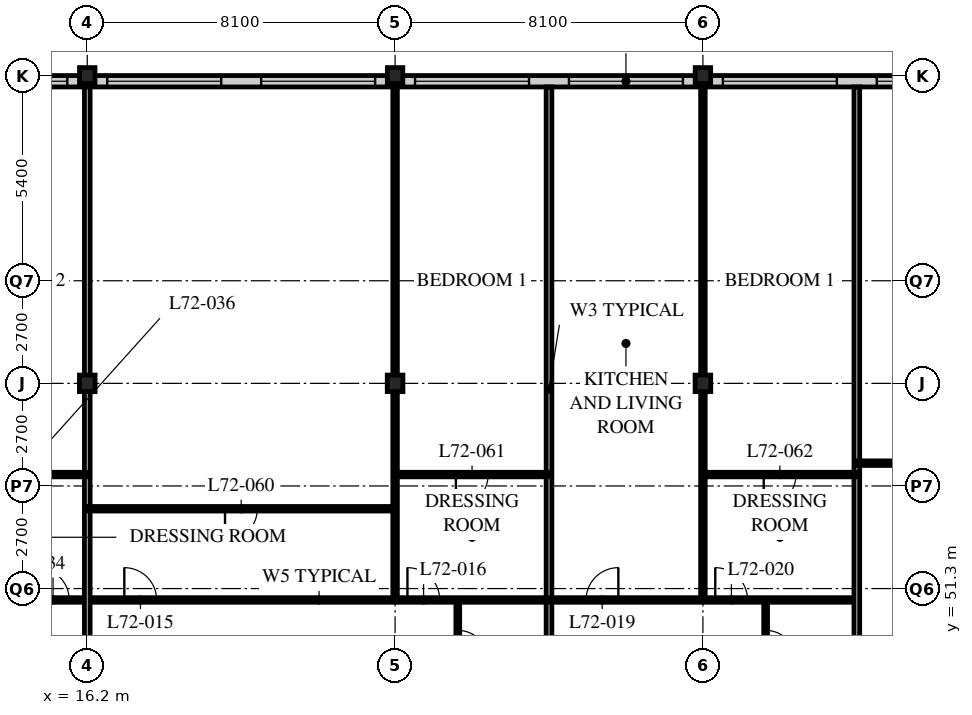
"""IFC4 building model, lengths in metres.
Left out: names, types, materials, properties, quantities, classifications, styles, units other than length and angle.
Written with IfcOpenShell. Run it as: python <this file> out.ifc"""

import sys

from ifc_helpers import new_model, si_unit, direction, frame, frame_2d, origin, origin_2d, place, context, subcontext, project, spatial, rectangle, i_section, extrude, element, fill, save


model = new_model("IFC4")
c1 = context("Model", 3, precision=1e-05, world=origin(), true_north=direction((0.0, 1.0)))
c2 = subcontext(c1, "Body", "Model", "MODEL_VIEW")
j1 = project(units=[si_unit("LENGTHUNIT", "METRE"), si_unit("PLANEANGLEUNIT", "RADIAN")], contexts=[c1])
p1 = place(None, origin())
s1 = spatial("IfcSite", under=j1, at=p1, CompositionType="ELEMENT")
p2 = place(p1, origin())
s2 = spatial("IfcBuilding", under=s1, at=p2, CompositionType="ELEMENT")
p3 = place(p2, frame((0.0, 0.0, 281.4)))
s3 = spatial("IfcBuildingStorey", under=s2, at=p3, CompositionType="ELEMENT", Elevation=281.4)
p4 = place(p3, frame((16.2, 56.7, 0.0), z_axis=(0.0, 0.0, 1.0), x_axis=(1.0, 0.0, 0.0)))
e1 = element("IfcColumn", 1, at=p4, inside=s3, PredefinedType="COLUMN", context=c2, shape_type="SweptSolid", body=[
    extrude(i_section(OverallWidth=0.412, OverallDepth=0.437, WebThickness=0.036, FlangeThickness=0.058, FilletRadius=0.015, at=origin_2d()), origin(), (0.0, 0.0, 1.0), 3.9),
])
p5 = place(p3, frame((16.2, 64.8, 0.0), z_axis=(0.0, 0.0, 1.0), x_axis=(1.0, 0.0, 0.0)))
e2 = element("IfcColumn", 2, at=p5, inside=s3, PredefinedType="COLUMN", context=c2, shape_type="SweptSolid", body=[
    extrude(i_section(OverallWidth=0.407, OverallDepth=0.419, WebThickness=0.031, FlangeThickness=0.049, FilletRadius=0.015, at=origin_2d()), origin(), (0.0, 0.0, 1.0), 3.9),
])
p6 = place(p3, frame((24.3, 56.7, 0.0), z_axis=(0.0, 0.0, 1.0), x_axis=(1.0, 0.0, 0.0)))
e3 = element("IfcColumn", 3, at=p6, inside=s3, PredefinedType="COLUMN", context=c2, shape_type="SweptSolid", body=[
    extrude(i_section(OverallWidth=0.412, OverallDepth=0.437, WebThickness=0.036, FlangeThickness=0.058, FilletRadius=0.015, at=origin_2d()), origin(), (0.0, 0.0, 1.0), 3.9),
])
p7 = place(p3, frame((24.3, 64.8, 0.0), z_axis=(0.0, 0.0, 1.0), x_axis=(1.0, 0.0, 0.0)))
e4 = element("IfcColumn", 4, at=p7, inside=s3, PredefinedType="COLUMN", context=c2, shape_type="SweptSolid", body=[
    extrude(i_section(OverallWidth=0.407, OverallDepth=0.419, WebThickness=0.031, FlangeThickness=0.049, FilletRadius=0.015, at=origin_2d()), origin(), (0.0, 0.0, 1.0), 3.9),
])
p8 = place(p3, frame((32.4, 56.7, 0.0), z_axis=(0.0, 0.0, 1.0), x_axis=(1.0, 0.0, 0.0)))
e5 = element("IfcColumn", 5, at=p8, inside=s3, PredefinedType="COLUMN", context=c2, shape_type="SweptSolid", body=[
    extrude(i_section(OverallWidth=0.412, OverallDepth=0.437, WebThickness=0.036, FlangeThickness=0.058, FilletRadius=0.015, at=origin_2d()), origin(), (0.0, 0.0, 1.0), 3.9),
])
p9 = place(p3, frame((32.4, 64.8, 0.0), z_axis=(0.0, 0.0, 1.0), x_axis=(1.0, 0.0, 0.0)))
e6 = element("IfcColumn", 6, at=p9, inside=s3, PredefinedType="COLUMN", context=c2, shape_type="SweptSolid", body=[
    extrude(i_section(OverallWidth=0.407, OverallDepth=0.419, WebThickness=0.031, FlangeThickness=0.049, FilletRadius=0.015, at=origin_2d()), origin(), (0.0, 0.0, 1.0), 3.9),
])
p10 = place(p3, frame((48.3, 64.65, 0.0), z_axis=(0.0, 0.0, 1.0), x_axis=(-1.0, 0.0, 0.0)))
e7 = element("IfcWall", 7, at=p10, inside=s3, PredefinedType="SOLIDWALL", context=c2, shape_type="SweptSolid", body=[
    extrude(rectangle(XDim=40.2, YDim=0.3, at=frame_2d((20.1, 0.0))), origin(), (0.0, 0.0, 1.0), 3.69),
])
p11 = place(p10, frame((0.225, 0.0, 0.6)))
e8 = element("IfcOpeningElement", 8, at=p11, cuts=e7, PredefinedType="OPENING", context=c2, shape_type="SweptSolid", body=[
    extrude(rectangle(XDim=3.0, YDim=2.4, at=frame_2d((1.5, 1.2))), frame((0.0, 0.16, 0.0), z_axis=(0.0, -1.0, 0.0), x_axis=(1.0, 0.0, 0.0)), (0.0, 0.0, 1.0), 0.32),
])
p12 = place(p10, frame((4.275, 0.0, 0.6)))
e9 = element("IfcOpeningElement", 9, at=p12, cuts=e7, PredefinedType="OPENING", context=c2, shape_type="SweptSolid", body=[
    extrude(rectangle(XDim=3.0, YDim=2.4, at=frame_2d((1.5, 1.2))), frame((0.0, 0.16, 0.0), z_axis=(0.0, -1.0, 0.0), x_axis=(1.0, 0.0, 0.0)), (0.0, 0.0, 1.0), 0.32),
])
p13 = place(p10, frame((8.325, 0.0, 0.6)))
e10 = element("IfcOpeningElement", 10, at=p13, cuts=e7, PredefinedType="OPENING", context=c2, shape_type="SweptSolid", body=[
    extrude(rectangle(XDim=3.0, YDim=2.4, at=frame_2d((1.5, 1.2))), frame((0.0, 0.16, 0.0), z_axis=(0.0, -1.0, 0.0), x_axis=(1.0, 0.0, 0.0)), (0.0, 0.0, 1.0), 0.32),
])
p14 = place(p10, frame((12.375, 0.0, 0.6)))
e11 = element("IfcOpeningElement", 11, at=p14, cuts=e7, PredefinedType="OPENING", context=c2, shape_type="SweptSolid", body=[
    extrude(rectangle(XDim=3.0, YDim=2.4, at=frame_2d((1.5, 1.2))), frame((0.0, 0.16, 0.0), z_axis=(0.0, -1.0, 0.0), x_axis=(1.0, 0.0, 0.0)), (0.0, 0.0, 1.0), 0.32),
])
p15 = place(p10, frame((16.425, 0.0, 0.6)))
e12 = element("IfcOpeningElement", 12, at=p15, cuts=e7, PredefinedType="OPENING", context=c2, shape_type="SweptSolid", body=[
    extrude(rectangle(XDim=3.0, YDim=2.4, at=frame_2d((1.5, 1.2))), frame((0.0, 0.16, 0.0), z_axis=(0.0, -1.0, 0.0), x_axis=(1.0, 0.0, 0.0)), (0.0, 0.0, 1.0), 0.32),
])
p16 = place(p10, frame((20.475, 0.0, 0.6)))
e13 = element("IfcOpeningElement", 13, at=p16, cuts=e7, PredefinedType="OPENING", context=c2, shape_type="SweptSolid", body=[
    extrude(rectangle(XDim=3.0, YDim=2.4, at=frame_2d((1.5, 1.2))), frame((0.0, 0.16, 0.0), z_axis=(0.0, -1.0, 0.0), x_axis=(1.0, 0.0, 0.0)), (0.0, 0.0, 1.0), 0.32),
])
p17 = place(p10, frame((24.525, 0.0, 0.6)))
e14 = element("IfcOpeningElement", 14, at=p17, cuts=e7, PredefinedType="OPENING", context=c2, shape_type="SweptSolid", body=[
    extrude(rectangle(XDim=3.0, YDim=2.4, at=frame_2d((1.5, 1.2))), frame((0.0, 0.16, 0.0), z_axis=(0.0, -1.0, 0.0), x_axis=(1.0, 0.0, 0.0)), (0.0, 0.0, 1.0), 0.32),
])
p18 = place(p10, frame((28.575, 0.0, 0.6)))
e15 = element("IfcOpeningElement", 15, at=p18, cuts=e7, PredefinedType="OPENING", context=c2, shape_type="SweptSolid", body=[
    extrude(rectangle(XDim=3.0, YDim=2.4, at=frame_2d((1.5, 1.2))), frame((0.0, 0.16, 0.0), z_axis=(0.0, -1.0, 0.0), x_axis=(1.0, 0.0, 0.0)), (0.0, 0.0, 1.0), 0.32),
])
p19 = place(p10, frame((32.625, 0.0, 0.6)))
e16 = element("IfcOpeningElement", 16, at=p19, cuts=e7, PredefinedType="OPENING", context=c2, shape_type="SweptSolid", body=[
    extrude(rectangle(XDim=3.0, YDim=2.4, at=frame_2d((1.5, 1.2))), frame((0.0, 0.16, 0.0), z_axis=(0.0, -1.0, 0.0), x_axis=(1.0, 0.0, 0.0)), (0.0, 0.0, 1.0), 0.32),
])
p20 = place(p10, frame((36.675, 0.0, 0.6)))
e17 = element("IfcOpeningElement", 17, at=p20, cuts=e7, PredefinedType="OPENING", context=c2, shape_type="SweptSolid", body=[
    extrude(rectangle(XDim=3.0, YDim=2.4, at=frame_2d((1.5, 1.2))), frame((0.0, 0.16, 0.0), z_axis=(0.0, -1.0, 0.0), x_axis=(1.0, 0.0, 0.0)), (0.0, 0.0, 1.0), 0.32),
])
p21 = place(p3, frame((25.95, 48.6, 0.0), z_axis=(0.0, 0.0, 1.0), x_axis=(0.0, 1.0, 0.0)))
e18 = element("IfcWall", 18, at=p21, inside=s3, PredefinedType="PARTITIONING", context=c2, shape_type="SweptSolid", body=[
    extrude(rectangle(XDim=2.4, YDim=0.1, at=frame_2d((1.2, 0.0))), origin(), (0.0, 0.0, 1.0), 3.69),
])
p22 = place(p21, frame((0.8, 0.0, 0.0)))
e19 = element("IfcOpeningElement", 19, at=p22, cuts=e18, PredefinedType="OPENING", context=c2, shape_type="SweptSolid", body=[
    extrude(rectangle(XDim=0.8, YDim=2.1, at=frame_2d((0.4, 1.05))), frame((0.0, 0.06, 0.0), z_axis=(0.0, -1.0, 0.0), x_axis=(1.0, 0.0, 0.0)), (0.0, 0.0, 1.0), 0.12),
])
p23 = place(p3, frame((24.3, 51.0, 0.0), z_axis=(0.0, 0.0, 1.0), x_axis=(0.0, 1.0, 0.0)))
e20 = element("IfcWall", 20, at=p23, inside=s3, PredefinedType="PARTITIONING", context=c2, shape_type="SweptSolid", body=[
    extrude(rectangle(XDim=13.5, YDim=0.12, at=frame_2d((6.75, 0.0))), origin(), (0.0, 0.0, 1.0), 3.078),
])
p24 = place(p3, frame((28.35, 48.6, 0.0), z_axis=(0.0, 0.0, 1.0), x_axis=(0.0, 1.0, 0.0)))
e21 = element("IfcWall", 21, at=p24, inside=s3, PredefinedType="PARTITIONING", context=c2, shape_type="SweptSolid", body=[
    extrude(rectangle(XDim=15.9, YDim=0.15, at=frame_2d((7.95, 0.0))), origin(), (0.0, 0.0, 1.0), 3.69),
])
p25 = place(p3, frame((34.05, 48.6, 0.0), z_axis=(0.0, 0.0, 1.0), x_axis=(0.0, 1.0, 0.0)))
e22 = element("IfcWall", 22, at=p25, inside=s3, PredefinedType="PARTITIONING", context=c2, shape_type="SweptSolid", body=[
    extrude(rectangle(XDim=2.4, YDim=0.1, at=frame_2d((1.2, 0.0))), origin(), (0.0, 0.0, 1.0), 3.69),
])
p26 = place(p25, frame((0.8, 0.0, 0.0)))
e23 = element("IfcOpeningElement", 23, at=p26, cuts=e22, PredefinedType="OPENING", context=c2, shape_type="SweptSolid", body=[
    extrude(rectangle(XDim=0.8, YDim=2.1, at=frame_2d((0.4, 1.05))), frame((0.0, 0.06, 0.0), z_axis=(0.0, -1.0, 0.0), x_axis=(1.0, 0.0, 0.0)), (0.0, 0.0, 1.0), 0.12),
])
p27 = place(p3, frame((32.4, 51.0, 0.0), z_axis=(0.0, 0.0, 1.0), x_axis=(0.0, 1.0, 0.0)))
e24 = element("IfcWall", 24, at=p27, inside=s3, PredefinedType="PARTITIONING", context=c2, shape_type="SweptSolid", body=[
    extrude(rectangle(XDim=13.5, YDim=0.12, at=frame_2d((6.75, 0.0))), origin(), (0.0, 0.0, 1.0), 3.078),
])
p28 = place(p3, frame((8.15, 51.0, 0.0), z_axis=(0.0, 0.0, 1.0), x_axis=(1.0, 0.0, 0.0)))
e25 = element("IfcWall", 25, at=p28, inside=s3, PredefinedType="PARTITIONING", context=c2, shape_type="SweptSolid", body=[
    extrude(rectangle(XDim=28.3, YDim=0.12, at=frame_2d((14.15, 0.0))), origin(), (0.0, 0.0, 1.0), 3.69),
])
p29 = place(p28, frame((9.025, 0.0, 0.0)))
e26 = element("IfcOpeningElement", 26, at=p29, cuts=e25, PredefinedType="OPENING", context=c2, shape_type="SweptSolid", body=[
    extrude(rectangle(XDim=0.85, YDim=2.1, at=frame_2d((0.425, 1.05))), frame((0.0, 0.07, 0.0), z_axis=(0.0, -1.0, 0.0), x_axis=(1.0, 0.0, 0.0)), (0.0, 0.0, 1.0), 0.14),
])
p30 = place(p28, frame((16.475, 0.0, 0.0)))
e27 = element("IfcOpeningElement", 27, at=p30, cuts=e25, PredefinedType="OPENING", context=c2, shape_type="SweptSolid", body=[
    extrude(rectangle(XDim=0.85, YDim=2.1, at=frame_2d((0.425, 1.05))), frame((0.0, 0.07, 0.0), z_axis=(0.0, -1.0, 0.0), x_axis=(1.0, 0.0, 0.0)), (0.0, 0.0, 1.0), 0.14),
])
p31 = place(p28, frame((21.175, 0.0, 0.0)))
e28 = element("IfcOpeningElement", 28, at=p31, cuts=e25, PredefinedType="OPENING", context=c2, shape_type="SweptSolid", body=[
    extrude(rectangle(XDim=0.85, YDim=2.1, at=frame_2d((0.425, 1.05))), frame((0.0, 0.07, 0.0), z_axis=(0.0, -1.0, 0.0), x_axis=(1.0, 0.0, 0.0)), (0.0, 0.0, 1.0), 0.14),
])
p32 = place(p28, frame((24.575, 0.0, 0.0)))
e29 = element("IfcOpeningElement", 29, at=p32, cuts=e25, PredefinedType="OPENING", context=c2, shape_type="SweptSolid", body=[
    extrude(rectangle(XDim=0.85, YDim=2.1, at=frame_2d((0.425, 1.05))), frame((0.0, 0.07, 0.0), z_axis=(0.0, -1.0, 0.0), x_axis=(1.0, 0.0, 0.0)), (0.0, 0.0, 1.0), 0.14),
])
p33 = place(p28, frame((6.725, 0.0, 0.0)))
e30 = element("IfcOpeningElement", 30, at=p33, cuts=e25, PredefinedType="OPENING", context=c2, shape_type="SweptSolid", body=[
    extrude(rectangle(XDim=0.85, YDim=2.1, at=frame_2d((0.425, 1.05))), frame((0.0, 0.07, 0.0), z_axis=(0.0, -1.0, 0.0), x_axis=(1.0, 0.0, 0.0)), (0.0, 0.0, 1.0), 0.14),
])
p34 = place(p28, frame((2.875, 0.0, 0.0)))
e31 = element("IfcOpeningElement", 31, at=p34, cuts=e25, PredefinedType="OPENING", context=c2, shape_type="SweptSolid", body=[
    extrude(rectangle(XDim=0.85, YDim=2.1, at=frame_2d((0.425, 1.05))), frame((0.0, 0.07, 0.0), z_axis=(0.0, -1.0, 0.0), x_axis=(1.0, 0.0, 0.0)), (0.0, 0.0, 1.0), 0.14),
])
p35 = place(p3, frame((16.2, 48.6, 0.0), z_axis=(0.0, 0.0, 1.0), x_axis=(0.0, 1.0, 0.0)))
e32 = element("IfcWall", 32, at=p35, inside=s3, PredefinedType="PARTITIONING", context=c2, shape_type="SweptSolid", body=[
    extrude(rectangle(XDim=15.9, YDim=0.15, at=frame_2d((7.95, 0.0))), origin(), (0.0, 0.0, 1.0), 3.078),
])
p36 = place(p3, frame((36.45, 64.5, 0.0), z_axis=(0.0, 0.0, 1.0), x_axis=(0.0, -1.0, 0.0)))
e33 = element("IfcWall", 33, at=p36, inside=s3, PredefinedType="PARTITIONING", context=c2, shape_type="SweptSolid", body=[
    extrude(rectangle(XDim=15.9, YDim=0.15, at=frame_2d((7.95, 0.0))), origin(), (0.0, 0.0, 1.0), 3.69),
])
p37 = place(p3, frame((36.45, 54.6, 0.0), z_axis=(0.0, 0.0, 1.0), x_axis=(1.0, 0.0, 0.0)))
e34 = element("IfcWall", 34, at=p37, inside=s3, PredefinedType="PARTITIONING", context=c2, shape_type="SweptSolid", body=[
    extrude(rectangle(XDim=19.95, YDim=0.12, at=frame_2d((9.975, 0.0))), origin(), (0.0, 0.0, 1.0), 3.69),
])
p38 = place(p37, frame((1.675, 0.0, 0.0)))
e35 = element("IfcOpeningElement", 35, at=p38, cuts=e34, PredefinedType="OPENING", context=c2, shape_type="SweptSolid", body=[
    extrude(rectangle(XDim=0.85, YDim=2.1, at=frame_2d((0.425, 1.05))), frame((0.0, 0.07, 0.0), z_axis=(0.0, -1.0, 0.0), x_axis=(1.0, 0.0, 0.0)), (0.0, 0.0, 1.0), 0.14),
])
p39 = place(p3, frame((16.2, 53.4, 0.0), z_axis=(0.0, 0.0, 1.0), x_axis=(1.0, 0.0, 0.0)))
e36 = element("IfcWall", 36, at=p39, inside=s3, PredefinedType="PARTITIONING", context=c2, shape_type="SweptSolid", body=[
    extrude(rectangle(XDim=8.1, YDim=0.12, at=frame_2d((4.05, 0.0))), origin(), (0.0, 0.0, 1.0), 3.69),
])
p40 = place(p39, frame((3.625, 0.0, 0.0)))
e37 = element("IfcOpeningElement", 37, at=p40, cuts=e36, PredefinedType="OPENING", context=c2, shape_type="SweptSolid", body=[
    extrude(rectangle(XDim=0.85, YDim=2.1, at=frame_2d((0.425, 1.05))), frame((0.0, 0.07, 0.0), z_axis=(0.0, -1.0, 0.0), x_axis=(1.0, 0.0, 0.0)), (0.0, 0.0, 1.0), 0.14),
])
p41 = place(p3, frame((24.3, 54.3, 0.0), z_axis=(0.0, 0.0, 1.0), x_axis=(1.0, 0.0, 0.0)))
e38 = element("IfcWall", 38, at=p41, inside=s3, PredefinedType="PARTITIONING", context=c2, shape_type="SweptSolid", body=[
    extrude(rectangle(XDim=4.05, YDim=0.12, at=frame_2d((2.025, 0.0))), origin(), (0.0, 0.0, 1.0), 3.69),
])
p42 = place(p41, frame((1.6, 0.0, 0.0)))
e39 = element("IfcOpeningElement", 39, at=p42, cuts=e38, PredefinedType="OPENING", context=c2, shape_type="SweptSolid", body=[
    extrude(rectangle(XDim=0.85, YDim=2.1, at=frame_2d((0.425, 1.05))), frame((0.0, 0.07, 0.0), z_axis=(0.0, -1.0, 0.0), x_axis=(1.0, 0.0, 0.0)), (0.0, 0.0, 1.0), 0.14),
])
p43 = place(p3, frame((32.4, 54.3, 0.0), z_axis=(0.0, 0.0, 1.0), x_axis=(1.0, 0.0, 0.0)))
e40 = element("IfcWall", 40, at=p43, inside=s3, PredefinedType="PARTITIONING", context=c2, shape_type="SweptSolid", body=[
    extrude(rectangle(XDim=4.05, YDim=0.12, at=frame_2d((2.025, 0.0))), origin(), (0.0, 0.0, 1.0), 3.69),
])
p44 = place(p43, frame((1.6, 0.0, 0.0)))
e41 = element("IfcOpeningElement", 41, at=p44, cuts=e40, PredefinedType="OPENING", context=c2, shape_type="SweptSolid", body=[
    extrude(rectangle(XDim=0.85, YDim=2.1, at=frame_2d((0.425, 1.05))), frame((0.0, 0.07, 0.0), z_axis=(0.0, -1.0, 0.0), x_axis=(1.0, 0.0, 0.0)), (0.0, 0.0, 1.0), 0.14),
])
p45 = place(p3, frame((12.15, 54.3, 0.0), z_axis=(0.0, 0.0, 1.0), x_axis=(1.0, 0.0, 0.0)))
e42 = element("IfcWall", 42, at=p45, inside=s3, PredefinedType="PARTITIONING", context=c2, shape_type="SweptSolid", body=[
    extrude(rectangle(XDim=4.05, YDim=0.12, at=frame_2d((2.025, 0.0))), origin(), (0.0, 0.0, 1.0), 3.69),
])
p46 = place(p45, frame((1.6, 0.0, 0.0)))
e43 = element("IfcOpeningElement", 43, at=p46, cuts=e42, PredefinedType="OPENING", context=c2, shape_type="SweptSolid", body=[
    extrude(rectangle(XDim=0.85, YDim=2.1, at=frame_2d((0.425, 1.05))), frame((0.0, 0.07, 0.0), z_axis=(0.0, -1.0, 0.0), x_axis=(1.0, 0.0, 0.0)), (0.0, 0.0, 1.0), 0.14),
])
p47 = place(p13, origin())
e44 = element("IfcWindow", 44, at=p47, inside=s3, PartitioningType="SINGLE_PANEL", PredefinedType="WINDOW", context=c2, shape_type="SweptSolid", body=[
    extrude(rectangle(XDim=3.0, YDim=2.4, at=frame_2d((1.5, 1.2))), frame((0.0, 0.03, 0.0), z_axis=(0.0, -1.0, 0.0), x_axis=(1.0, 0.0, 0.0)), (0.0, 0.0, 1.0), 0.06),
])
fill(e10, e44)
p48 = place(p14, origin())
e45 = element("IfcWindow", 45, at=p48, inside=s3, PartitioningType="SINGLE_PANEL", PredefinedType="WINDOW", context=c2, shape_type="SweptSolid", body=[
    extrude(rectangle(XDim=3.0, YDim=2.4, at=frame_2d((1.5, 1.2))), frame((0.0, 0.03, 0.0), z_axis=(0.0, -1.0, 0.0), x_axis=(1.0, 0.0, 0.0)), (0.0, 0.0, 1.0), 0.06),
])
fill(e11, e45)
p49 = place(p15, origin())
e46 = element("IfcWindow", 46, at=p49, inside=s3, PartitioningType="SINGLE_PANEL", PredefinedType="WINDOW", context=c2, shape_type="SweptSolid", body=[
    extrude(rectangle(XDim=3.0, YDim=2.4, at=frame_2d((1.5, 1.2))), frame((0.0, 0.03, 0.0), z_axis=(0.0, -1.0, 0.0), x_axis=(1.0, 0.0, 0.0)), (0.0, 0.0, 1.0), 0.06),
])
fill(e12, e46)
p50 = place(p16, origin())
e47 = element("IfcWindow", 47, at=p50, inside=s3, PartitioningType="SINGLE_PANEL", PredefinedType="WINDOW", context=c2, shape_type="SweptSolid", body=[
    extrude(rectangle(XDim=3.0, YDim=2.4, at=frame_2d((1.5, 1.2))), frame((0.0, 0.03, 0.0), z_axis=(0.0, -1.0, 0.0), x_axis=(1.0, 0.0, 0.0)), (0.0, 0.0, 1.0), 0.06),
])
fill(e13, e47)
p51 = place(p17, origin())
e48 = element("IfcWindow", 48, at=p51, inside=s3, PartitioningType="SINGLE_PANEL", PredefinedType="WINDOW", context=c2, shape_type="SweptSolid", body=[
    extrude(rectangle(XDim=3.0, YDim=2.4, at=frame_2d((1.5, 1.2))), frame((0.0, 0.03, 0.0), z_axis=(0.0, -1.0, 0.0), x_axis=(1.0, 0.0, 0.0)), (0.0, 0.0, 1.0), 0.06),
])
fill(e14, e48)
p52 = place(p18, origin())
e49 = element("IfcWindow", 49, at=p52, inside=s3, PartitioningType="SINGLE_PANEL", PredefinedType="WINDOW", context=c2, shape_type="SweptSolid", body=[
    extrude(rectangle(XDim=3.0, YDim=2.4, at=frame_2d((1.5, 1.2))), frame((0.0, 0.03, 0.0), z_axis=(0.0, -1.0, 0.0), x_axis=(1.0, 0.0, 0.0)), (0.0, 0.0, 1.0), 0.06),
])
fill(e15, e49)
p53 = place(p19, origin())
e50 = element("IfcWindow", 50, at=p53, inside=s3, PartitioningType="SINGLE_PANEL", PredefinedType="WINDOW", context=c2, shape_type="SweptSolid", body=[
    extrude(rectangle(XDim=3.0, YDim=2.4, at=frame_2d((1.5, 1.2))), frame((0.0, 0.03, 0.0), z_axis=(0.0, -1.0, 0.0), x_axis=(1.0, 0.0, 0.0)), (0.0, 0.0, 1.0), 0.06),
])
fill(e16, e50)
p54 = place(p22, origin())
e51 = element("IfcDoor", 51, at=p54, inside=s3, OperationType="SINGLE_SWING_RIGHT", PredefinedType="DOOR", context=c2, shape_type="SweptSolid", body=[
    extrude(rectangle(XDim=0.8, YDim=2.1, at=frame_2d((0.4, 1.05))), frame((0.0, 0.025, 0.0), z_axis=(0.0, -1.0, 0.0), x_axis=(1.0, 0.0, 0.0)), (0.0, 0.0, 1.0), 0.05),
])
fill(e19, e51)
p55 = place(p29, origin())
e52 = element("IfcDoor", 52, at=p55, inside=s3, OperationType="SINGLE_SWING_LEFT", PredefinedType="DOOR", context=c2, shape_type="SweptSolid", body=[
    extrude(rectangle(XDim=0.85, YDim=2.1, at=frame_2d((0.425, 1.05))), frame((0.0, 0.025, 0.0), z_axis=(0.0, -1.0, 0.0), x_axis=(1.0, 0.0, 0.0)), (0.0, 0.0, 1.0), 0.05),
])
fill(e26, e52)
p56 = place(p30, origin())
e53 = element("IfcDoor", 53, at=p56, inside=s3, OperationType="SINGLE_SWING_LEFT", PredefinedType="DOOR", context=c2, shape_type="SweptSolid", body=[
    extrude(rectangle(XDim=0.85, YDim=2.1, at=frame_2d((0.425, 1.05))), frame((0.0, 0.025, 0.0), z_axis=(0.0, -1.0, 0.0), x_axis=(1.0, 0.0, 0.0)), (0.0, 0.0, 1.0), 0.05),
])
fill(e27, e53)
p57 = place(p26, origin())
e54 = element("IfcDoor", 54, at=p57, inside=s3, OperationType="SINGLE_SWING_RIGHT", PredefinedType="DOOR", context=c2, shape_type="SweptSolid", body=[
    extrude(rectangle(XDim=0.8, YDim=2.1, at=frame_2d((0.4, 1.05))), frame((0.0, 0.025, 0.0), z_axis=(0.0, -1.0, 0.0), x_axis=(1.0, 0.0, 0.0)), (0.0, 0.0, 1.0), 0.05),
])
fill(e23, e54)
p58 = place(p31, origin())
e55 = element("IfcDoor", 55, at=p58, inside=s3, OperationType="SINGLE_SWING_RIGHT", PredefinedType="DOOR", context=c2, shape_type="SweptSolid", body=[
    extrude(rectangle(XDim=0.85, YDim=2.1, at=frame_2d((0.425, 1.05))), frame((0.0, 0.025, 0.0), z_axis=(0.0, -1.0, 0.0), x_axis=(1.0, 0.0, 0.0)), (0.0, 0.0, 1.0), 0.05),
])
fill(e28, e55)
p59 = place(p32, origin())
e56 = element("IfcDoor", 56, at=p59, inside=s3, OperationType="SINGLE_SWING_LEFT", PredefinedType="DOOR", context=c2, shape_type="SweptSolid", body=[
    extrude(rectangle(XDim=0.85, YDim=2.1, at=frame_2d((0.425, 1.05))), frame((0.0, 0.025, 0.0), z_axis=(0.0, -1.0, 0.0), x_axis=(1.0, 0.0, 0.0)), (0.0, 0.0, 1.0), 0.05),
])
fill(e29, e56)
p60 = place(p33, origin())
e57 = element("IfcDoor", 57, at=p60, inside=s3, OperationType="SINGLE_SWING_LEFT", PredefinedType="DOOR", context=c2, shape_type="SweptSolid", body=[
    extrude(rectangle(XDim=0.85, YDim=2.1, at=frame_2d((0.425, 1.05))), frame((0.0, 0.025, 0.0), z_axis=(0.0, -1.0, 0.0), x_axis=(1.0, 0.0, 0.0)), (0.0, 0.0, 1.0), 0.05),
])
fill(e30, e57)
p61 = place(p40, origin())
e58 = element("IfcDoor", 58, at=p61, inside=s3, OperationType="SINGLE_SWING_RIGHT", PredefinedType="DOOR", context=c2, shape_type="SweptSolid", body=[
    extrude(rectangle(XDim=0.85, YDim=2.1, at=frame_2d((0.425, 1.05))), frame((0.0, 0.025, 0.0), z_axis=(0.0, -1.0, 0.0), x_axis=(1.0, 0.0, 0.0)), (0.0, 0.0, 1.0), 0.05),
])
fill(e37, e58)
p62 = place(p42, origin())
e59 = element("IfcDoor", 59, at=p62, inside=s3, OperationType="SINGLE_SWING_RIGHT", PredefinedType="DOOR", context=c2, shape_type="SweptSolid", body=[
    extrude(rectangle(XDim=0.85, YDim=2.1, at=frame_2d((0.425, 1.05))), frame((0.0, 0.025, 0.0), z_axis=(0.0, -1.0, 0.0), x_axis=(1.0, 0.0, 0.0)), (0.0, 0.0, 1.0), 0.05),
])
fill(e39, e59)
p63 = place(p44, origin())
e60 = element("IfcDoor", 60, at=p63, inside=s3, OperationType="SINGLE_SWING_RIGHT", PredefinedType="DOOR", context=c2, shape_type="SweptSolid", body=[
    extrude(rectangle(XDim=0.85, YDim=2.1, at=frame_2d((0.425, 1.05))), frame((0.0, 0.025, 0.0), z_axis=(0.0, -1.0, 0.0), x_axis=(1.0, 0.0, 0.0)), (0.0, 0.0, 1.0), 0.05),
])
fill(e41, e60)
save(model, sys.argv[1])
